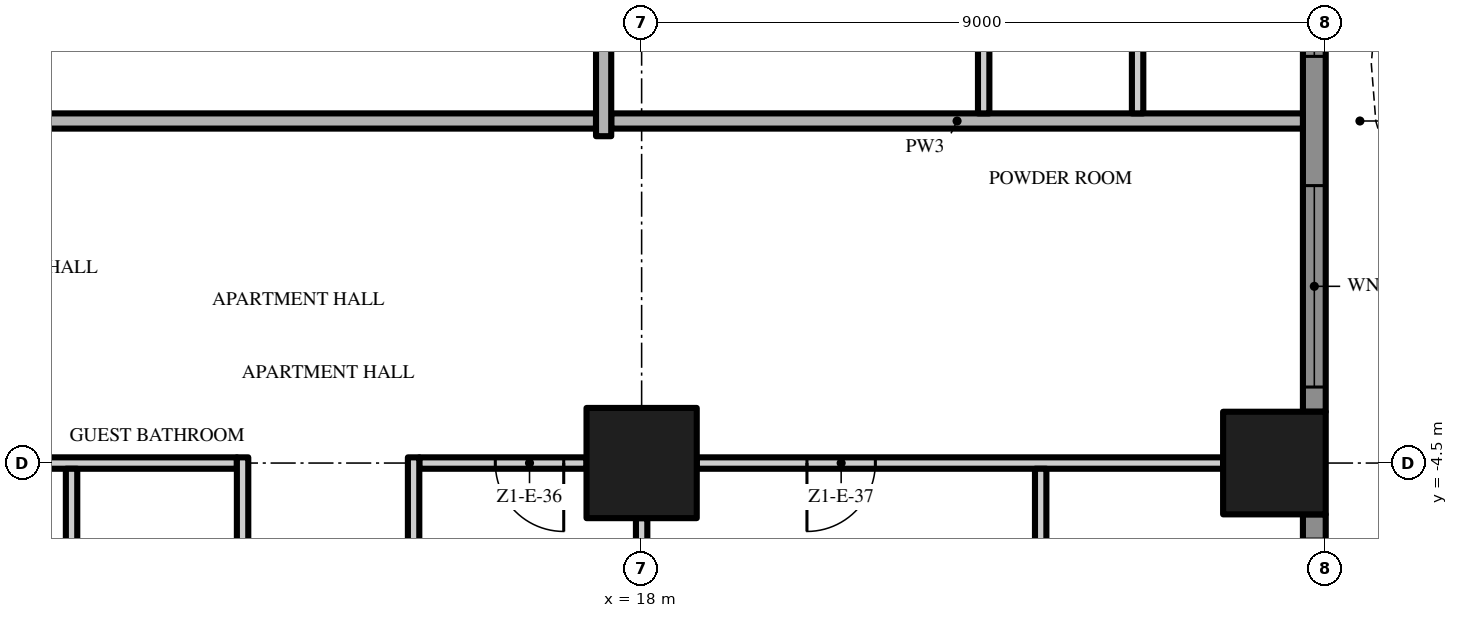
"""IFC4 building model, lengths in metres.
Left out: names, types, materials, properties, quantities, classifications, styles, units other than length and angle.
Written with IfcOpenShell. Run it as: python <this file> out.ifc"""

import sys

from ifc_helpers import new_model, si_unit, direction, frame, frame_2d, origin, origin_2d, place, context, subcontext, project, spatial, polyline, rectangle, outline, extrude, element, fill, save


model = new_model("IFC4")
c1 = context("Model", 3, precision=1e-05, world=origin(), true_north=direction((0.0, 1.0)))
c2 = subcontext(c1, "Body", "Model", "MODEL_VIEW")
j1 = project(units=[si_unit("LENGTHUNIT", "METRE"), si_unit("PLANEANGLEUNIT", "RADIAN")], contexts=[c1])
p1 = place(None, origin())
s1 = spatial("IfcSite", under=j1, at=p1, CompositionType="ELEMENT")
p2 = place(p1, origin())
s2 = spatial("IfcBuilding", under=s1, at=p2, CompositionType="ELEMENT")
p3 = place(p2, frame((0.0, 0.0, 60.6)))
s3 = spatial("IfcBuildingStorey", under=s2, at=p3, CompositionType="ELEMENT", Elevation=60.6)
p4 = place(p3, frame((18.0, -4.5, 0.0), z_axis=(0.0, 0.0, 1.0), x_axis=(1.0, 0.0, 0.0)))
e1 = element("IfcColumn", 1, at=p4, inside=s3, PredefinedType="COLUMN", context=c2, shape_type="SweptSolid", body=[
    extrude(rectangle(XDim=1.45, YDim=1.45, at=origin_2d()), origin(), (0.0, 0.0, 1.0), 3.5),
])
p5 = place(p3, frame((26.325, -4.5, 0.0), z_axis=(0.0, 0.0, 1.0), x_axis=(1.0, 0.0, 0.0)))
e2 = element("IfcColumn", 2, at=p5, inside=s3, PredefinedType="COLUMN", context=c2, shape_type="SweptSolid", body=[
    extrude(rectangle(XDim=1.35, YDim=1.35, at=origin_2d()), origin(), (0.0, 0.0, 1.0), 3.5),
])
p6 = place(p3, frame((26.85, -5.175, 0.0), z_axis=(0.0, 0.0, 1.0), x_axis=(0.0, -1.0, 0.0)))
e3 = element("IfcWall", 3, at=p6, inside=s3, PredefinedType="SOLIDWALL", context=c2, shape_type="SweptSolid", body=[
    extrude(rectangle(XDim=7.65, YDim=0.3, at=frame_2d((3.825, 0.0))), origin(), (0.0, 0.0, 1.0), 3.5),
])
p7 = place(p6, frame((4.675, 0.0, 0.45)))
e4 = element("IfcOpeningElement", 4, at=p7, cuts=e3, PredefinedType="OPENING", context=c2, shape_type="SweptSolid", body=[
    extrude(rectangle(XDim=2.65, YDim=2.65, at=frame_2d((1.325, 1.325))), frame((0.0, 0.16, 0.0), z_axis=(0.0, -1.0, 0.0), x_axis=(1.0, 0.0, 0.0)), (0.0, 0.0, 1.0), 0.32),
])
p8 = place(p6, frame((0.325, 0.0, 0.0)))
e5 = element("IfcOpeningElement", 5, at=p8, cuts=e3, PredefinedType="OPENING", context=c2, shape_type="SweptSolid", body=[
    extrude(rectangle(XDim=2.65, YDim=2.4, at=frame_2d((1.325, 1.2))), frame((0.0, 0.16, 0.0), z_axis=(0.0, -1.0, 0.0), x_axis=(1.0, 0.0, 0.0)), (0.0, 0.0, 1.0), 0.32),
])
p9 = place(p3, frame((26.85, 3.825, 0.0), z_axis=(0.0, 0.0, 1.0), x_axis=(0.0, -1.0, 0.0)))
e6 = element("IfcWall", 6, at=p9, inside=s3, PredefinedType="SOLIDWALL", context=c2, shape_type="SweptSolid", body=[
    extrude(rectangle(XDim=7.65, YDim=0.3, at=frame_2d((3.825, 0.0))), origin(), (0.0, 0.0, 1.0), 3.5),
])
p10 = place(p9, frame((4.675, 0.0, 0.45)))
e7 = element("IfcOpeningElement", 7, at=p10, cuts=e6, PredefinedType="OPENING", context=c2, shape_type="SweptSolid", body=[
    extrude(rectangle(XDim=2.65, YDim=2.65, at=frame_2d((1.325, 1.325))), frame((0.0, 0.16, 0.0), z_axis=(0.0, -1.0, 0.0), x_axis=(1.0, 0.0, 0.0)), (0.0, 0.0, 1.0), 0.32),
])
p11 = place(p9, frame((0.325, 0.0, 0.45)))
e8 = element("IfcOpeningElement", 8, at=p11, cuts=e6, PredefinedType="OPENING", context=c2, shape_type="SweptSolid", body=[
    extrude(rectangle(XDim=2.65, YDim=2.65, at=frame_2d((1.325, 1.325))), frame((0.0, 0.16, 0.0), z_axis=(0.0, -1.0, 0.0), x_axis=(1.0, 0.0, 0.0)), (0.0, 0.0, 1.0), 0.32),
])
p12 = place(p3, origin())
e9 = element("IfcWall", 9, at=p12, inside=s3, PredefinedType="USERDEFINED", context=c2, shape_type="SweptSolid", body=[
    extrude(outline(polyline([(28.8, -18.0), (28.095, -16.5), (27.659, -15.0), (27.6, -14.25), (27.659, -13.5), (28.095, -12.0), (28.8, -10.5), (29.505, -9.0), (29.941, -7.5), (30.0, -6.75), (29.941, -6.0), (29.505, -4.5), (28.8, -3.0), (28.095, -1.5), (27.659, 0.0), (27.6, 0.75), (27.659, 1.5), (28.095, 3.0), (28.8, 4.5), (29.505, 6.0), (29.941, 7.5), (30.0, 8.25), (29.941, 9.0), (29.505, 10.5), (28.8, 12.0), (28.095, 13.5), (27.659, 15.0), (27.6, 15.75), (27.659, 16.5), (28.095, 18.0), (27.855, 18.07), (27.411, 16.545), (27.349, 15.75), (27.411, 14.955), (27.86, 13.411), (28.574, 11.894), (29.271, 10.411), (29.694, 8.955), (29.749, 8.25), (29.694, 7.545), (29.271, 6.089), (28.574, 4.606), (27.86, 3.089), (27.411, 1.545), (27.349, 0.75), (27.411, -0.045), (27.86, -1.589), (28.574, -3.106), (29.271, -4.589), (29.694, -6.045), (29.749, -6.75), (29.694, -7.455), (29.271, -8.911), (28.574, -10.394), (27.86, -11.911), (27.411, -13.455), (27.349, -14.25), (27.411, -15.045), (27.86, -16.589), (28.574, -18.106), (28.8, -18.0)])), origin(), (0.0, 0.0, 1.0), 0.9),
])
p13 = place(p3, frame((9.725, -4.5, 0.0), z_axis=(0.0, 0.0, 1.0), x_axis=(1.0, 0.0, 0.0)))
e10 = element("IfcWall", 10, at=p13, inside=s3, PredefinedType="PARTITIONING", context=c2, shape_type="SweptSolid", body=[
    extrude(rectangle(XDim=2.95, YDim=0.15, at=frame_2d((1.475, 0.0))), origin(), (0.0, 0.0, 1.0), 3.5),
])
p14 = place(p3, frame((17.275, -4.5, 0.0), z_axis=(0.0, 0.0, 1.0), x_axis=(-1.0, 0.0, 0.0)))
e11 = element("IfcWall", 11, at=p14, inside=s3, PredefinedType="PARTITIONING", context=c2, shape_type="SweptSolid", body=[
    extrude(rectangle(XDim=2.2, YDim=0.15, at=frame_2d((1.1, 0.0))), origin(), (0.0, 0.0, 1.0), 3.5),
])
p15 = place(p14, frame((0.3, 0.0, 0.0)))
e12 = element("IfcOpeningElement", 12, at=p15, cuts=e11, PredefinedType="OPENING", context=c2, shape_type="SweptSolid", body=[
    extrude(rectangle(XDim=0.9, YDim=2.1, at=frame_2d((0.45, 1.05))), frame((0.0, 0.085, 0.0), z_axis=(0.0, -1.0, 0.0), x_axis=(1.0, 0.0, 0.0)), (0.0, 0.0, 1.0), 0.17),
])
p16 = place(p3, frame((25.65, -4.5, 0.0), z_axis=(0.0, 0.0, 1.0), x_axis=(-1.0, 0.0, 0.0)))
e13 = element("IfcWall", 13, at=p16, inside=s3, PredefinedType="PARTITIONING", context=c2, shape_type="SweptSolid", body=[
    extrude(rectangle(XDim=6.925, YDim=0.15, at=frame_2d((3.462, 0.0))), origin(), (0.0, 0.0, 1.0), 3.5),
])
p17 = place(p16, frame((4.575, 0.0, 0.0)))
e14 = element("IfcOpeningElement", 14, at=p17, cuts=e13, PredefinedType="OPENING", context=c2, shape_type="SweptSolid", body=[
    extrude(rectangle(XDim=0.9, YDim=2.1, at=frame_2d((0.45, 1.05))), frame((0.0, 0.085, 0.0), z_axis=(0.0, -1.0, 0.0), x_axis=(1.0, 0.0, 0.0)), (0.0, 0.0, 1.0), 0.17),
])
p18 = place(p3, frame((17.4, 0.0, 0.0), z_axis=(0.0, 0.0, 1.0), x_axis=(-1.0, 0.0, 0.0)))
e15 = element("IfcWall", 15, at=p18, inside=s3, PredefinedType="PARTITIONING", context=c2, shape_type="SweptSolid", body=[
    extrude(rectangle(XDim=17.3, YDim=0.2, at=frame_2d((8.65, 0.0))), origin(), (0.0, 0.0, 1.0), 3.5),
])
p19 = place(p18, frame((7.65, 0.0, 0.0)))
e16 = element("IfcOpeningElement", 16, at=p19, cuts=e15, PredefinedType="OPENING", context=c2, shape_type="SweptSolid", body=[
    extrude(rectangle(XDim=1.5, YDim=2.4, at=frame_2d((0.75, 1.2))), frame((0.0, 0.11, 0.0), z_axis=(0.0, -1.0, 0.0), x_axis=(1.0, 0.0, 0.0)), (0.0, 0.0, 1.0), 0.22),
])
p20 = place(p3, frame((17.6, 0.0, 0.0), z_axis=(0.0, 0.0, 1.0), x_axis=(1.0, 0.0, 0.0)))
e17 = element("IfcWall", 17, at=p20, inside=s3, PredefinedType="PARTITIONING", context=c2, shape_type="SweptSolid", body=[
    extrude(rectangle(XDim=9.1, YDim=0.2, at=frame_2d((4.55, 0.0))), origin(), (0.0, 0.0, 1.0), 3.5),
])
p21 = place(p3, frame((10.5, -8.925, 0.0), z_axis=(0.0, 0.0, 1.0), x_axis=(0.0, 1.0, 0.0)))
e18 = element("IfcWall", 18, at=p21, inside=s3, PredefinedType="PARTITIONING", context=c2, shape_type="SweptSolid", body=[
    extrude(rectangle(XDim=4.35, YDim=0.15, at=frame_2d((2.175, 0.0))), origin(), (0.0, 0.0, 1.0), 3.5),
])
p22 = place(p3, frame((12.75, -8.925, 0.0), z_axis=(0.0, 0.0, 1.0), x_axis=(0.0, 1.0, 0.0)))
e19 = element("IfcWall", 19, at=p22, inside=s3, PredefinedType="PARTITIONING", context=c2, shape_type="SweptSolid", body=[
    extrude(rectangle(XDim=4.5, YDim=0.15, at=frame_2d((2.25, 0.0))), origin(), (0.0, 0.0, 1.0), 3.5),
])
p23 = place(p22, frame((1.75, 0.0, 0.0)))
e20 = element("IfcOpeningElement", 20, at=p23, cuts=e19, PredefinedType="OPENING", context=c2, shape_type="SweptSolid", body=[
    extrude(rectangle(XDim=0.9, YDim=2.1, at=frame_2d((0.45, 1.05))), frame((0.0, 0.085, 0.0), z_axis=(0.0, -1.0, 0.0), x_axis=(1.0, 0.0, 0.0)), (0.0, 0.0, 1.0), 0.17),
])
p24 = place(p3, frame((15.0, -9.075, 0.0), z_axis=(0.0, 0.0, 1.0), x_axis=(0.0, 1.0, 0.0)))
e21 = element("IfcWall", 21, at=p24, inside=s3, PredefinedType="PARTITIONING", context=c2, shape_type="SweptSolid", body=[
    extrude(rectangle(XDim=4.65, YDim=0.15, at=frame_2d((2.325, 0.0))), origin(), (0.0, 0.0, 1.0), 3.5),
])
p25 = place(p3, frame((17.5, -0.2, 0.0), z_axis=(0.0, 0.0, 1.0), x_axis=(0.0, 1.0, 0.0)))
e22 = element("IfcWall", 22, at=p25, inside=s3, PredefinedType="PARTITIONING", context=c2, shape_type="SweptSolid", body=[
    extrude(rectangle(XDim=3.975, YDim=0.2, at=frame_2d((1.988, 0.0))), origin(), (0.0, 0.0, 1.0), 3.5),
])
p26 = place(p3, frame((18.0, -8.925, 0.0), z_axis=(0.0, 0.0, 1.0), x_axis=(0.0, 1.0, 0.0)))
e23 = element("IfcWall", 23, at=p26, inside=s3, PredefinedType="PARTITIONING", context=c2, shape_type="SweptSolid", body=[
    extrude(rectangle(XDim=3.7, YDim=0.15, at=frame_2d((1.85, 0.0))), origin(), (0.0, 0.0, 1.0), 3.5),
])
p27 = place(p3, frame((22.5, 17.325, 0.0), z_axis=(0.0, 0.0, 1.0), x_axis=(0.0, -1.0, 0.0)))
e24 = element("IfcWall", 24, at=p27, inside=s3, PredefinedType="PARTITIONING", context=c2, shape_type="SweptSolid", body=[
    extrude(rectangle(XDim=17.225, YDim=0.15, at=frame_2d((8.613, 0.0))), origin(), (0.0, 0.0, 1.0), 3.5),
])
p28 = place(p27, frame((13.025, 0.0, 0.0)))
e25 = element("IfcOpeningElement", 25, at=p28, cuts=e24, PredefinedType="OPENING", context=c2, shape_type="SweptSolid", body=[
    extrude(rectangle(XDim=1.8, YDim=2.4, at=frame_2d((0.9, 1.2))), frame((0.0, 0.085, 0.0), z_axis=(0.0, -1.0, 0.0), x_axis=(1.0, 0.0, 0.0)), (0.0, 0.0, 1.0), 0.17),
])
p29 = place(p27, frame((5.575, 0.0, 0.0)))
e26 = element("IfcOpeningElement", 26, at=p29, cuts=e24, PredefinedType="OPENING", context=c2, shape_type="SweptSolid", body=[
    extrude(rectangle(XDim=1.0, YDim=2.4, at=frame_2d((0.5, 1.2))), frame((0.0, 0.085, 0.0), z_axis=(0.0, -1.0, 0.0), x_axis=(1.0, 0.0, 0.0)), (0.0, 0.0, 1.0), 0.17),
])
p30 = place(p27, frame((0.15, 0.0, 0.0)))
e27 = element("IfcOpeningElement", 27, at=p30, cuts=e24, PredefinedType="OPENING", context=c2, shape_type="SweptSolid", body=[
    extrude(rectangle(XDim=1.0, YDim=2.4, at=frame_2d((0.5, 1.2))), frame((0.0, 0.085, 0.0), z_axis=(0.0, -1.0, 0.0), x_axis=(1.0, 0.0, 0.0)), (0.0, 0.0, 1.0), 0.17),
])
p31 = place(p3, frame((23.25, -4.575, 0.0), z_axis=(0.0, 0.0, 1.0), x_axis=(0.0, -1.0, 0.0)))
e28 = element("IfcWall", 28, at=p31, inside=s3, PredefinedType="PARTITIONING", context=c2, shape_type="SweptSolid", body=[
    extrude(rectangle(XDim=4.35, YDim=0.15, at=frame_2d((2.175, 0.0))), origin(), (0.0, 0.0, 1.0), 3.5),
])
p32 = place(p31, frame((1.7, 0.0, 0.0)))
e29 = element("IfcOpeningElement", 29, at=p32, cuts=e28, PredefinedType="OPENING", context=c2, shape_type="SweptSolid", body=[
    extrude(rectangle(XDim=0.9, YDim=2.1, at=frame_2d((0.45, 1.05))), frame((0.0, 0.085, 0.0), z_axis=(0.0, -1.0, 0.0), x_axis=(1.0, 0.0, 0.0)), (0.0, 0.0, 1.0), 0.17),
])
p33 = place(p3, frame((24.525, 0.1, 0.0), z_axis=(0.0, 0.0, 1.0), x_axis=(0.0, 1.0, 0.0)))
e30 = element("IfcWall", 30, at=p33, inside=s3, PredefinedType="PARTITIONING", context=c2, shape_type="SweptSolid", body=[
    extrude(rectangle(XDim=2.225, YDim=0.15, at=frame_2d((1.113, 0.0))), origin(), (0.0, 0.0, 1.0), 3.5),
])
p34 = place(p10, origin())
e31 = element("IfcWindow", 31, at=p34, inside=s3, PartitioningType="SINGLE_PANEL", PredefinedType="WINDOW", context=c2, shape_type="SweptSolid", body=[
    extrude(rectangle(XDim=2.65, YDim=2.65, at=frame_2d((1.325, 1.325))), frame((0.0, 0.03, 0.0), z_axis=(0.0, -1.0, 0.0), x_axis=(1.0, 0.0, 0.0)), (0.0, 0.0, 1.0), 0.06),
])
fill(e7, e31)
p35 = place(p11, origin())
e32 = element("IfcWindow", 32, at=p35, inside=s3, PartitioningType="SINGLE_PANEL", PredefinedType="WINDOW", context=c2, shape_type="SweptSolid", body=[
    extrude(rectangle(XDim=2.65, YDim=2.65, at=frame_2d((1.325, 1.325))), frame((0.0, 0.03, 0.0), z_axis=(0.0, -1.0, 0.0), x_axis=(1.0, 0.0, 0.0)), (0.0, 0.0, 1.0), 0.06),
])
fill(e8, e32)
p36 = place(p15, origin())
e33 = element("IfcDoor", 33, at=p36, inside=s3, OperationType="SINGLE_SWING_LEFT", PredefinedType="DOOR", context=c2, shape_type="SweptSolid", body=[
    extrude(rectangle(XDim=0.9, YDim=2.1, at=frame_2d((0.45, 1.05))), frame((0.0, 0.025, 0.0), z_axis=(0.0, -1.0, 0.0), x_axis=(1.0, 0.0, 0.0)), (0.0, 0.0, 1.0), 0.05),
])
fill(e12, e33)
p37 = place(p17, origin())
e34 = element("IfcDoor", 34, at=p37, inside=s3, OperationType="SINGLE_SWING_RIGHT", PredefinedType="DOOR", context=c2, shape_type="SweptSolid", body=[
    extrude(rectangle(XDim=0.9, YDim=2.1, at=frame_2d((0.45, 1.05))), frame((0.0, 0.025, 0.0), z_axis=(0.0, -1.0, 0.0), x_axis=(1.0, 0.0, 0.0)), (0.0, 0.0, 1.0), 0.05),
])
fill(e14, e34)
save(model, sys.argv[1])
